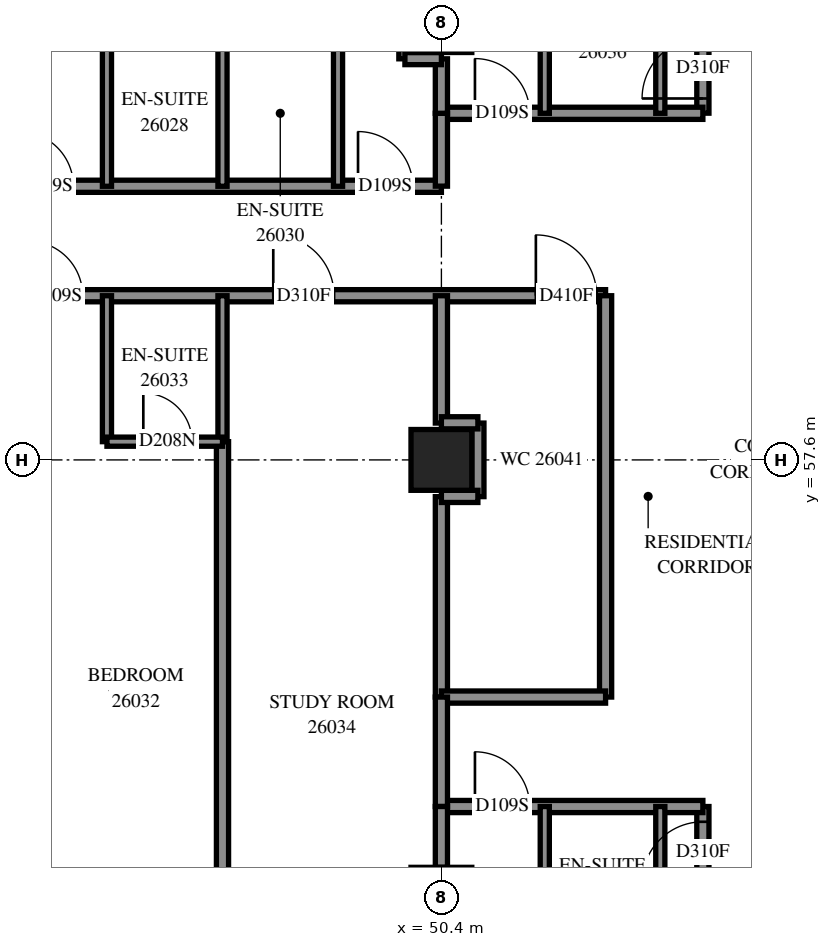
"""IFC4 building model, lengths in metres.
Left out: names, types, materials, properties, quantities, classifications, styles, units other than length and angle.
Written with IfcOpenShell. Run it as: python <this file> out.ifc"""

import sys

from ifc_helpers import new_model, si_unit, direction, frame, frame_2d, origin, origin_2d, place, context, subcontext, project, spatial, rectangle, extrude, element, fill, save


model = new_model("IFC4")
c1 = context("Model", 3, precision=1e-05, world=origin(), true_north=direction((0.0, 1.0)))
c2 = subcontext(c1, "Body", "Model", "MODEL_VIEW")
j1 = project(units=[si_unit("LENGTHUNIT", "METRE"), si_unit("PLANEANGLEUNIT", "RADIAN")], contexts=[c1])
p1 = place(None, origin())
s1 = spatial("IfcSite", under=j1, at=p1, CompositionType="ELEMENT")
p2 = place(p1, origin())
s2 = spatial("IfcBuilding", under=s1, at=p2, CompositionType="ELEMENT")
p3 = place(p2, frame((0.0, 0.0, 98.2)))
s3 = spatial("IfcBuildingStorey", under=s2, at=p3, CompositionType="ELEMENT", Elevation=98.2)
p4 = place(p3, frame((50.4, 57.6, 0.0), z_axis=(0.0, 0.0, 1.0), x_axis=(1.0, 0.0, 0.0)))
e1 = element("IfcColumn", 1, at=p4, inside=s3, PredefinedType="COLUMN", context=c2, shape_type="SweptSolid", body=[
    extrude(rectangle(XDim=1.0, YDim=1.0, at=origin_2d()), origin(), (0.0, 0.0, 1.0), 3.1),
])
p5 = place(p3, frame((28.802, 60.3, 0.0), z_axis=(0.0, 0.0, 1.0), x_axis=(1.0, 0.0, 0.0)))
e2 = element("IfcWall", 2, at=p5, inside=s3, PredefinedType="PARTITIONING", context=c2, shape_type="SweptSolid", body=[
    extrude(rectangle(XDim=24.298, YDim=0.2, at=frame_2d((12.149, 0.0))), origin(), (0.0, 0.0, 1.0), 3.1),
])
p6 = place(p5, frame((5.972, 0.0, 0.0)))
e3 = element("IfcOpeningElement", 3, at=p6, cuts=e2, PredefinedType="OPENING", context=c2, shape_type="SweptSolid", body=[
    extrude(rectangle(XDim=1.0, YDim=2.1, at=frame_2d((0.5, 1.05))), frame((0.0, 0.11, 0.0), z_axis=(0.0, -1.0, 0.0), x_axis=(1.0, 0.0, 0.0)), (0.0, 0.0, 1.0), 0.22),
])
p7 = place(p5, frame((11.323, 0.0, 0.0)))
e4 = element("IfcOpeningElement", 4, at=p7, cuts=e2, PredefinedType="OPENING", context=c2, shape_type="SweptSolid", body=[
    extrude(rectangle(XDim=1.0, YDim=2.1, at=frame_2d((0.5, 1.05))), frame((0.0, 0.11, 0.0), z_axis=(0.0, -1.0, 0.0), x_axis=(1.0, 0.0, 0.0)), (0.0, 0.0, 1.0), 0.22),
])
p8 = place(p5, frame((14.798, 0.0, 0.0)))
e5 = element("IfcOpeningElement", 5, at=p8, cuts=e2, PredefinedType="OPENING", context=c2, shape_type="SweptSolid", body=[
    extrude(rectangle(XDim=0.9, YDim=2.1, at=frame_2d((0.45, 1.05))), frame((0.0, 0.11, 0.0), z_axis=(0.0, -1.0, 0.0), x_axis=(1.0, 0.0, 0.0)), (0.0, 0.0, 1.0), 0.22),
])
p9 = place(p5, frame((18.833, 0.0, 0.0)))
e6 = element("IfcOpeningElement", 6, at=p9, cuts=e2, PredefinedType="OPENING", context=c2, shape_type="SweptSolid", body=[
    extrude(rectangle(XDim=1.0, YDim=2.1, at=frame_2d((0.5, 1.05))), frame((0.0, 0.11, 0.0), z_axis=(0.0, -1.0, 0.0), x_axis=(1.0, 0.0, 0.0)), (0.0, 0.0, 1.0), 0.22),
])
p10 = place(p5, frame((23.151, 0.0, 0.0)))
e7 = element("IfcOpeningElement", 7, at=p10, cuts=e2, PredefinedType="OPENING", context=c2, shape_type="SweptSolid", body=[
    extrude(rectangle(XDim=1.0, YDim=2.1, at=frame_2d((0.5, 1.05))), frame((0.0, 0.11, 0.0), z_axis=(0.0, -1.0, 0.0), x_axis=(1.0, 0.0, 0.0)), (0.0, 0.0, 1.0), 0.22),
])
p11 = place(p3, frame((33.3, 62.1, 0.0), z_axis=(0.0, 0.0, 1.0), x_axis=(1.0, 0.0, 0.0)))
e8 = element("IfcWall", 8, at=p11, inside=s3, PredefinedType="PARTITIONING", context=c2, shape_type="SweptSolid", body=[
    extrude(rectangle(XDim=17.1, YDim=0.2, at=frame_2d((8.55, 0.0))), origin(), (0.0, 0.0, 1.0), 3.1),
])
p12 = place(p11, frame((6.258, 0.0, 0.0)))
e9 = element("IfcOpeningElement", 9, at=p12, cuts=e8, PredefinedType="OPENING", context=c2, shape_type="SweptSolid", body=[
    extrude(rectangle(XDim=1.0, YDim=2.1, at=frame_2d((0.5, 1.05))), frame((0.0, 0.11, 0.0), z_axis=(0.0, -1.0, 0.0), x_axis=(1.0, 0.0, 0.0)), (0.0, 0.0, 1.0), 0.22),
])
p13 = place(p11, frame((10.148, 0.0, 0.0)))
e10 = element("IfcOpeningElement", 10, at=p13, cuts=e8, PredefinedType="OPENING", context=c2, shape_type="SweptSolid", body=[
    extrude(rectangle(XDim=0.9, YDim=2.1, at=frame_2d((0.45, 1.05))), frame((0.0, 0.11, 0.0), z_axis=(0.0, -1.0, 0.0), x_axis=(1.0, 0.0, 0.0)), (0.0, 0.0, 1.0), 0.22),
])
p14 = place(p11, frame((15.729, 0.0, 0.0)))
e11 = element("IfcOpeningElement", 11, at=p14, cuts=e8, PredefinedType="OPENING", context=c2, shape_type="SweptSolid", body=[
    extrude(rectangle(XDim=0.9, YDim=2.1, at=frame_2d((0.45, 1.05))), frame((0.0, 0.11, 0.0), z_axis=(0.0, -1.0, 0.0), x_axis=(1.0, 0.0, 0.0)), (0.0, 0.0, 1.0), 0.22),
])
p15 = place(p3, frame((46.8, 49.75, 0.0), z_axis=(0.0, 0.0, 1.0), x_axis=(0.0, 1.0, 0.0)))
e12 = element("IfcWall", 12, at=p15, inside=s3, PredefinedType="PARTITIONING", context=c2, shape_type="SweptSolid", body=[
    extrude(rectangle(XDim=8.15, YDim=0.2, at=frame_2d((4.075, 0.0))), origin(), (0.0, 0.0, 1.0), 3.1),
])
p16 = place(p3, frame((53.1, 53.7, 0.0), z_axis=(0.0, 0.0, 1.0), x_axis=(0.0, 1.0, 0.0)))
e13 = element("IfcWall", 13, at=p16, inside=s3, PredefinedType="PARTITIONING", context=c2, shape_type="SweptSolid", body=[
    extrude(rectangle(XDim=6.6, YDim=0.2, at=frame_2d((3.3, 0.0))), origin(), (0.0, 0.0, 1.0), 3.1),
])
p17 = place(p3, frame((54.7, 47.5, 0.0), z_axis=(0.0, 0.0, 1.0), x_axis=(0.0, 1.0, 0.0)))
e14 = element("IfcWall", 14, at=p17, inside=s3, PredefinedType="PARTITIONING", context=c2, shape_type="SweptSolid", body=[
    extrude(rectangle(XDim=4.4, YDim=0.2, at=frame_2d((2.2, 0.0))), origin(), (0.0, 0.0, 1.0), 3.1),
])
p18 = place(p17, frame((3.149, 0.0, 0.0)))
e15 = element("IfcOpeningElement", 15, at=p18, cuts=e14, PredefinedType="OPENING", context=c2, shape_type="SweptSolid", body=[
    extrude(rectangle(XDim=1.0, YDim=2.1, at=frame_2d((0.5, 1.05))), frame((0.0, 0.11, 0.0), z_axis=(0.0, -1.0, 0.0), x_axis=(1.0, 0.0, 0.0)), (0.0, 0.0, 1.0), 0.22),
])
p19 = place(p3, frame((54.7, 63.302, 0.0), z_axis=(0.0, 0.0, 1.0), x_axis=(0.0, 1.0, 0.0)))
e16 = element("IfcWall", 16, at=p19, inside=s3, PredefinedType="PARTITIONING", context=c2, shape_type="SweptSolid", body=[
    extrude(rectangle(XDim=4.398, YDim=0.2, at=frame_2d((2.199, 0.0))), origin(), (0.0, 0.0, 1.0), 3.1),
])
p20 = place(p19, frame((0.242, 0.0, 0.0)))
e17 = element("IfcOpeningElement", 17, at=p20, cuts=e16, PredefinedType="OPENING", context=c2, shape_type="SweptSolid", body=[
    extrude(rectangle(XDim=1.0, YDim=2.1, at=frame_2d((0.5, 1.05))), frame((0.0, 0.11, 0.0), z_axis=(0.0, -1.0, 0.0), x_axis=(1.0, 0.0, 0.0)), (0.0, 0.0, 1.0), 0.22),
])
p21 = place(p3, frame((50.4, 51.9, 0.0), z_axis=(0.0, 0.0, 1.0), x_axis=(1.0, 0.0, 0.0)))
e18 = element("IfcWall", 18, at=p21, inside=s3, PredefinedType="PARTITIONING", context=c2, shape_type="SweptSolid", body=[
    extrude(rectangle(XDim=4.3, YDim=0.2, at=frame_2d((2.15, 0.0))), origin(), (0.0, 0.0, 1.0), 3.1),
])
p22 = place(p21, frame((0.552, 0.0, 0.0)))
e19 = element("IfcOpeningElement", 19, at=p22, cuts=e18, PredefinedType="OPENING", context=c2, shape_type="SweptSolid", body=[
    extrude(rectangle(XDim=0.9, YDim=2.1, at=frame_2d((0.45, 1.05))), frame((0.0, 0.11, 0.0), z_axis=(0.0, -1.0, 0.0), x_axis=(1.0, 0.0, 0.0)), (0.0, 0.0, 1.0), 0.22),
])
p23 = place(p3, frame((50.4, 63.3, 0.0), z_axis=(0.0, 0.0, 1.0), x_axis=(1.0, 0.0, 0.0)))
e20 = element("IfcWall", 20, at=p23, inside=s3, PredefinedType="PARTITIONING", context=c2, shape_type="SweptSolid", body=[
    extrude(rectangle(XDim=4.3, YDim=0.2, at=frame_2d((2.15, 0.0))), origin(), (0.0, 0.0, 1.0), 3.1),
])
p24 = place(p23, frame((0.552, 0.0, 0.0)))
e21 = element("IfcOpeningElement", 21, at=p24, cuts=e20, PredefinedType="OPENING", context=c2, shape_type="SweptSolid", body=[
    extrude(rectangle(XDim=0.9, YDim=2.1, at=frame_2d((0.45, 1.05))), frame((0.0, 0.11, 0.0), z_axis=(0.0, -1.0, 0.0), x_axis=(1.0, 0.0, 0.0)), (0.0, 0.0, 1.0), 0.22),
])
p25 = place(p3, frame((50.4, 53.7, 0.0), z_axis=(0.0, 0.0, 1.0), x_axis=(0.0, 1.0, 0.0)))
e22 = element("IfcWall", 22, at=p25, inside=s3, PredefinedType="PARTITIONING", context=c2, shape_type="SweptSolid", body=[
    extrude(rectangle(XDim=3.296, YDim=0.2, at=frame_2d((1.648, 0.0))), origin(), (0.0, 0.0, 1.0), 3.1),
])
p26 = place(p3, frame((50.4, 53.7, 0.0), z_axis=(0.0, 0.0, 1.0), x_axis=(1.0, 0.0, 0.0)))
e23 = element("IfcWall", 23, at=p26, inside=s3, PredefinedType="PARTITIONING", context=c2, shape_type="SweptSolid", body=[
    extrude(rectangle(XDim=2.7, YDim=0.2, at=frame_2d((1.35, 0.0))), origin(), (0.0, 0.0, 1.0), 3.1),
])
for number, where, z_axis, x_axis in (
    (24, (52.1, 63.3, 0.0), (0.0, 0.0, 1.0), (0.0, 1.0, 0.0)),
    (25, (54.0, 63.3, 0.0), (0.0, 0.0, 1.0), (0.0, 1.0, 0.0)),
    (26, (44.9, 57.9, 0.0), (0.0, 0.0, 1.0), (0.0, 1.0, 0.0)),
    (27, (44.9, 62.1, 0.0), (0.0, 0.0, 1.0), (0.0, 1.0, 0.0)),
    (28, (46.8, 57.9, 0.0), (0.0, 0.0, 1.0), (0.0, 1.0, 0.0)),
    (29, (46.8, 62.1, 0.0), (0.0, 0.0, 1.0), (0.0, 1.0, 0.0)),
    (30, (48.7, 62.1, 0.0), (0.0, 0.0, 1.0), (0.0, 1.0, 0.0)),
    (31, (52.1, 49.5, 0.0), (0.0, 0.0, 1.0), (0.0, 1.0, 0.0)),
    (32, (54.0, 49.5, 0.0), (0.0, 0.0, 1.0), (0.0, 1.0, 0.0)),
):
    element("IfcWall", number, at=place(p3, frame(where, z_axis=z_axis, x_axis=x_axis)), inside=s3, PredefinedType="PARTITIONING", context=c2, shape_type="SweptSolid", body=[
        extrude(rectangle(XDim=2.4, YDim=0.15, at=frame_2d((1.2, 0.0))), origin(), (0.0, 0.0, 1.0), 3.1),
    ])
p27 = place(p3, frame((50.4, 58.206, 0.0), z_axis=(0.0, 0.0, 1.0), x_axis=(0.0, 1.0, 0.0)))
e33 = element("IfcWall", 33, at=p27, inside=s3, PredefinedType="PARTITIONING", context=c2, shape_type="SweptSolid", body=[
    extrude(rectangle(XDim=2.094, YDim=0.2, at=frame_2d((1.047, 0.0))), origin(), (0.0, 0.0, 1.0), 3.1),
])
p28 = place(p3, frame((44.9, 57.9, 0.0), z_axis=(0.0, 0.0, 1.0), x_axis=(1.0, 0.0, 0.0)))
e34 = element("IfcWall", 34, at=p28, inside=s3, PredefinedType="PARTITIONING", context=c2, shape_type="SweptSolid", body=[
    extrude(rectangle(XDim=1.9, YDim=0.15, at=frame_2d((0.95, 0.0))), origin(), (0.0, 0.0, 1.0), 3.1),
])
p29 = place(p28, frame((0.598, 0.0, 0.0)))
e35 = element("IfcOpeningElement", 35, at=p29, cuts=e34, PredefinedType="OPENING", context=c2, shape_type="SweptSolid", body=[
    extrude(rectangle(XDim=0.8, YDim=2.1, at=frame_2d((0.4, 1.05))), frame((0.0, 0.085, 0.0), z_axis=(0.0, -1.0, 0.0), x_axis=(1.0, 0.0, 0.0)), (0.0, 0.0, 1.0), 0.17),
])
p30 = place(p3, frame((50.4, 51.9, 0.0), z_axis=(0.0, 0.0, 1.0), x_axis=(0.0, 1.0, 0.0)))
e36 = element("IfcWall", 36, at=p30, inside=s3, PredefinedType="PARTITIONING", context=c2, shape_type="SweptSolid", body=[
    extrude(rectangle(XDim=1.8, YDim=0.2, at=frame_2d((0.9, 0.0))), origin(), (0.0, 0.0, 1.0), 3.1),
])
p31 = place(p3, frame((51.0, 56.996, 0.0), z_axis=(0.0, 0.0, 1.0), x_axis=(0.0, 1.0, 0.0)))
e37 = element("IfcWall", 37, at=p31, inside=s3, PredefinedType="PARTITIONING", context=c2, shape_type="SweptSolid", body=[
    extrude(rectangle(XDim=1.21, YDim=0.2, at=frame_2d((0.605, 0.0))), origin(), (0.0, 0.0, 1.0), 3.1),
])
p32 = place(p3, frame((49.8, 64.196, 0.0), z_axis=(0.0, 0.0, 1.0), x_axis=(0.0, 1.0, 0.0)))
e38 = element("IfcWall", 38, at=p32, inside=s3, PredefinedType="PARTITIONING", context=c2, shape_type="SweptSolid", body=[
    extrude(rectangle(XDim=1.208, YDim=0.2, at=frame_2d((0.604, 0.0))), origin(), (0.0, 0.0, 1.0), 3.1),
])
p33 = place(p3, frame((50.4, 62.102, 0.0), z_axis=(0.0, 0.0, 1.0), x_axis=(0.0, 1.0, 0.0)))
e39 = element("IfcWall", 39, at=p33, inside=s3, PredefinedType="PARTITIONING", context=c2, shape_type="SweptSolid", body=[
    extrude(rectangle(XDim=1.198, YDim=0.2, at=frame_2d((0.599, 0.0))), origin(), (0.0, 0.0, 1.0), 3.1),
])
p34 = place(p3, frame((50.4, 50.9, 0.0), z_axis=(0.0, 0.0, 1.0), x_axis=(0.0, 1.0, 0.0)))
e40 = element("IfcWall", 40, at=p34, inside=s3, PredefinedType="PARTITIONING", context=c2, shape_type="SweptSolid", body=[
    extrude(rectangle(XDim=1.0, YDim=0.2, at=frame_2d((0.5, 0.0))), origin(), (0.0, 0.0, 1.0), 3.1),
])
p35 = place(p3, frame((50.4, 63.3, 0.0), z_axis=(0.0, 0.0, 1.0), x_axis=(0.0, 1.0, 0.0)))
e41 = element("IfcWall", 41, at=p35, inside=s3, PredefinedType="PARTITIONING", context=c2, shape_type="SweptSolid", body=[
    extrude(rectangle(XDim=0.896, YDim=0.2, at=frame_2d((0.448, 0.0))), origin(), (0.0, 0.0, 1.0), 3.1),
])
for number, where, z_axis, x_axis in (
    (42, (49.8, 64.2, 0.0), (0.0, 0.0, 1.0), (1.0, 0.0, 0.0)),
    (43, (50.4, 58.21, 0.0), (0.0, 0.0, 1.0), (1.0, 0.0, 0.0)),
    (44, (50.4, 57.0, 0.0), (0.0, 0.0, 1.0), (1.0, 0.0, 0.0)),
):
    element("IfcWall", number, at=place(p3, frame(where, z_axis=z_axis, x_axis=x_axis)), inside=s3, PredefinedType="PARTITIONING", context=c2, shape_type="SweptSolid", body=[
        extrude(rectangle(XDim=0.6, YDim=0.2, at=frame_2d((0.3, 0.0))), origin(), (0.0, 0.0, 1.0), 3.1),
    ])
p36 = place(p13, origin())
e45 = element("IfcDoor", 45, at=p36, inside=s3, OperationType="SINGLE_SWING_RIGHT", PredefinedType="DOOR", context=c2, shape_type="SweptSolid", body=[
    extrude(rectangle(XDim=0.9, YDim=2.1, at=frame_2d((0.45, 1.05))), frame((0.0, 0.025, 0.0), z_axis=(0.0, -1.0, 0.0), x_axis=(1.0, 0.0, 0.0)), (0.0, 0.0, 1.0), 0.05),
])
fill(e10, e45)
p37 = place(p14, origin())
e46 = element("IfcDoor", 46, at=p37, inside=s3, OperationType="SINGLE_SWING_LEFT", PredefinedType="DOOR", context=c2, shape_type="SweptSolid", body=[
    extrude(rectangle(XDim=0.9, YDim=2.1, at=frame_2d((0.45, 1.05))), frame((0.0, 0.025, 0.0), z_axis=(0.0, -1.0, 0.0), x_axis=(1.0, 0.0, 0.0)), (0.0, 0.0, 1.0), 0.05),
])
fill(e11, e46)
p38 = place(p8, origin())
e47 = element("IfcDoor", 47, at=p38, inside=s3, OperationType="SINGLE_SWING_LEFT", PredefinedType="DOOR", context=c2, shape_type="SweptSolid", body=[
    extrude(rectangle(XDim=0.9, YDim=2.1, at=frame_2d((0.45, 1.05))), frame((0.0, 0.025, 0.0), z_axis=(0.0, -1.0, 0.0), x_axis=(1.0, 0.0, 0.0)), (0.0, 0.0, 1.0), 0.05),
])
fill(e5, e47)
p39 = place(p29, origin())
e48 = element("IfcDoor", 48, at=p39, inside=s3, OperationType="SINGLE_SWING_RIGHT", PredefinedType="DOOR", context=c2, shape_type="SweptSolid", body=[
    extrude(rectangle(XDim=0.8, YDim=2.1, at=frame_2d((0.4, 1.05))), frame((0.0, 0.025, 0.0), z_axis=(0.0, -1.0, 0.0), x_axis=(1.0, 0.0, 0.0)), (0.0, 0.0, 1.0), 0.05),
])
fill(e35, e48)
p40 = place(p9, origin())
e49 = element("IfcDoor", 49, at=p40, inside=s3, OperationType="SINGLE_SWING_RIGHT", PredefinedType="DOOR", context=c2, shape_type="SweptSolid", body=[
    extrude(rectangle(XDim=1.0, YDim=2.1, at=frame_2d((0.5, 1.05))), frame((0.0, 0.025, 0.0), z_axis=(0.0, -1.0, 0.0), x_axis=(1.0, 0.0, 0.0)), (0.0, 0.0, 1.0), 0.05),
])
fill(e6, e49)
p41 = place(p24, origin())
e50 = element("IfcDoor", 50, at=p41, inside=s3, OperationType="SINGLE_SWING_RIGHT", PredefinedType="DOOR", context=c2, shape_type="SweptSolid", body=[
    extrude(rectangle(XDim=0.9, YDim=2.1, at=frame_2d((0.45, 1.05))), frame((0.0, 0.025, 0.0), z_axis=(0.0, -1.0, 0.0), x_axis=(1.0, 0.0, 0.0)), (0.0, 0.0, 1.0), 0.05),
])
fill(e21, e50)
p42 = place(p20, origin())
e51 = element("IfcDoor", 51, at=p42, inside=s3, OperationType="SINGLE_SWING_LEFT", PredefinedType="DOOR", context=c2, shape_type="SweptSolid", body=[
    extrude(rectangle(XDim=1.0, YDim=2.1, at=frame_2d((0.5, 1.05))), frame((0.0, 0.025, 0.0), z_axis=(0.0, -1.0, 0.0), x_axis=(1.0, 0.0, 0.0)), (0.0, 0.0, 1.0), 0.05),
])
fill(e17, e51)
p43 = place(p10, origin())
e52 = element("IfcDoor", 52, at=p43, inside=s3, OperationType="SINGLE_SWING_LEFT", PredefinedType="DOOR", context=c2, shape_type="SweptSolid", body=[
    extrude(rectangle(XDim=1.0, YDim=2.1, at=frame_2d((0.5, 1.05))), frame((0.0, 0.025, 0.0), z_axis=(0.0, -1.0, 0.0), x_axis=(1.0, 0.0, 0.0)), (0.0, 0.0, 1.0), 0.05),
])
fill(e7, e52)
p44 = place(p22, origin())
e53 = element("IfcDoor", 53, at=p44, inside=s3, OperationType="SINGLE_SWING_LEFT", PredefinedType="DOOR", context=c2, shape_type="SweptSolid", body=[
    extrude(rectangle(XDim=0.9, YDim=2.1, at=frame_2d((0.45, 1.05))), frame((0.0, 0.025, 0.0), z_axis=(0.0, -1.0, 0.0), x_axis=(1.0, 0.0, 0.0)), (0.0, 0.0, 1.0), 0.05),
])
fill(e19, e53)
p45 = place(p18, origin())
e54 = element("IfcDoor", 54, at=p45, inside=s3, OperationType="SINGLE_SWING_RIGHT", PredefinedType="DOOR", context=c2, shape_type="SweptSolid", body=[
    extrude(rectangle(XDim=1.0, YDim=2.1, at=frame_2d((0.5, 1.05))), frame((0.0, 0.025, 0.0), z_axis=(0.0, -1.0, 0.0), x_axis=(1.0, 0.0, 0.0)), (0.0, 0.0, 1.0), 0.05),
])
fill(e15, e54)
save(model, sys.argv[1])
